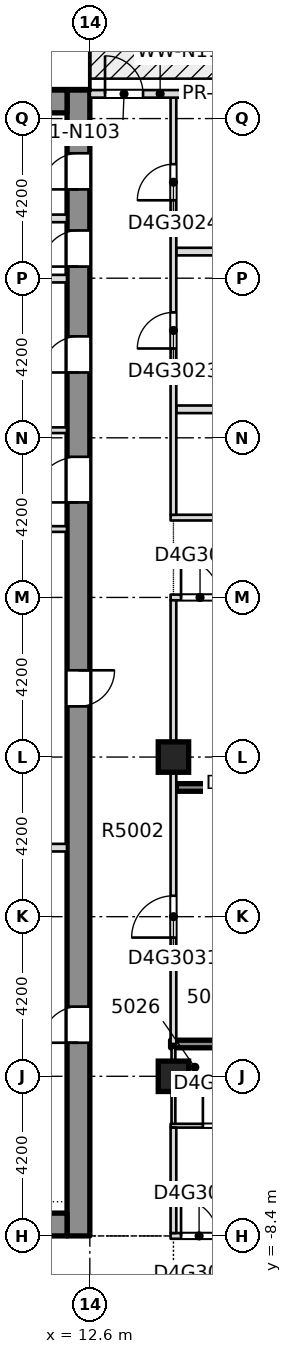
"""IFC4 building model, lengths in metres.
Left out: names, types, materials, properties, quantities, classifications, styles, units other than length and angle.
Written with IfcOpenShell. Run it as: python <this file> out.ifc"""

import sys

from ifc_helpers import new_model, si_unit, direction, frame, frame_2d, origin, origin_2d, place, context, subcontext, project, spatial, rectangle, extrude, element, fill, save


model = new_model("IFC4")
c1 = context("Model", 3, precision=1e-05, world=origin(), true_north=direction((0.0, 1.0)))
c2 = subcontext(c1, "Body", "Model", "MODEL_VIEW")
j1 = project(units=[si_unit("LENGTHUNIT", "METRE"), si_unit("PLANEANGLEUNIT", "RADIAN")], contexts=[c1])
p1 = place(None, origin())
s1 = spatial("IfcSite", under=j1, at=p1, CompositionType="ELEMENT")
p2 = place(p1, origin())
s2 = spatial("IfcBuilding", under=s1, at=p2, CompositionType="ELEMENT")
p3 = place(p2, frame((0.0, 0.0, 192.8)))
s3 = spatial("IfcBuildingStorey", under=s2, at=p3, CompositionType="ELEMENT", Elevation=192.8)
p4 = place(p3, frame((12.3, -8.4, -0.4), z_axis=(0.0, 0.0, 1.0), x_axis=(0.0, 1.0, 0.0)))
e1 = element("IfcWall", 1, at=p4, inside=s3, PredefinedType="SHEAR", context=c2, shape_type="SweptSolid", body=[
    extrude(rectangle(XDim=30.15, YDim=0.6, at=frame_2d((15.075, 0.0))), origin(), (0.0, 0.0, 1.0), 3.45),
])
p5 = place(p4, frame((5.083, 0.0, 0.4)))
e2 = element("IfcOpeningElement", 2, at=p5, cuts=e1, PredefinedType="OPENING", context=c2, shape_type="SweptSolid", body=[
    extrude(rectangle(XDim=0.95, YDim=2.1, at=frame_2d((0.475, 1.05))), frame((0.0, 0.31, 0.0), z_axis=(0.0, -1.0, 0.0), x_axis=(1.0, 0.0, 0.0)), (0.0, 0.0, 1.0), 0.62),
])
p6 = place(p4, frame((13.933, 0.0, 0.4)))
e3 = element("IfcOpeningElement", 3, at=p6, cuts=e1, PredefinedType="OPENING", context=c2, shape_type="SweptSolid", body=[
    extrude(rectangle(XDim=0.95, YDim=2.1, at=frame_2d((0.475, 1.05))), frame((0.0, 0.31, 0.0), z_axis=(0.0, -1.0, 0.0), x_axis=(1.0, 0.0, 0.0)), (0.0, 0.0, 1.0), 0.62),
])
p7 = place(p4, frame((22.719, 0.0, 0.4)))
e4 = element("IfcOpeningElement", 4, at=p7, cuts=e1, PredefinedType="OPENING", context=c2, shape_type="SweptSolid", body=[
    extrude(rectangle(XDim=0.95, YDim=2.1, at=frame_2d((0.475, 1.05))), frame((0.0, 0.31, 0.0), z_axis=(0.0, -1.0, 0.0), x_axis=(1.0, 0.0, 0.0)), (0.0, 0.0, 1.0), 0.62),
])
p8 = place(p4, frame((25.506, 0.0, 0.4)))
e5 = element("IfcOpeningElement", 5, at=p8, cuts=e1, PredefinedType="OPENING", context=c2, shape_type="SweptSolid", body=[
    extrude(rectangle(XDim=0.95, YDim=2.1, at=frame_2d((0.475, 1.05))), frame((0.0, 0.31, 0.0), z_axis=(0.0, -1.0, 0.0), x_axis=(1.0, 0.0, 0.0)), (0.0, 0.0, 1.0), 0.62),
])
p9 = place(p4, frame((27.537, 0.0, 0.4)))
e6 = element("IfcOpeningElement", 6, at=p9, cuts=e1, PredefinedType="OPENING", context=c2, shape_type="SweptSolid", body=[
    extrude(rectangle(XDim=0.95, YDim=2.1, at=frame_2d((0.475, 1.05))), frame((0.0, 0.31, 0.0), z_axis=(0.0, -1.0, 0.0), x_axis=(1.0, 0.0, 0.0)), (0.0, 0.0, 1.0), 0.62),
])
p10 = place(p4, frame((19.3, 0.0, 0.4)))
e7 = element("IfcOpeningElement", 7, at=p10, cuts=e1, PredefinedType="OPENING", context=c2, shape_type="SweptSolid", body=[
    extrude(rectangle(XDim=1.2, YDim=2.1, at=frame_2d((0.6, 1.05))), frame((0.0, 0.31, 0.0), z_axis=(0.0, -1.0, 0.0), x_axis=(1.0, 0.0, 0.0)), (0.0, 0.0, 1.0), 0.62),
])
p11 = place(p3, frame((-12.0, -8.1, -0.4), z_axis=(0.0, 0.0, 1.0), x_axis=(1.0, 0.0, 0.0)))
e8 = element("IfcWall", 8, at=p11, inside=s3, PredefinedType="SHEAR", context=c2, shape_type="SweptSolid", body=[
    extrude(rectangle(XDim=24.0, YDim=0.6, at=frame_2d((12.0, 0.0))), origin(), (0.0, 0.0, 1.0), 3.45),
])
p12 = place(p11, frame((7.25, 0.0, 0.4)))
e9 = element("IfcOpeningElement", 9, at=p12, cuts=e8, PredefinedType="OPENING", context=c2, shape_type="SweptSolid", body=[
    extrude(rectangle(XDim=1.8, YDim=2.1, at=frame_2d((0.9, 1.05))), frame((0.0, 0.31, 0.0), z_axis=(0.0, -1.0, 0.0), x_axis=(1.0, 0.0, 0.0)), (0.0, 0.0, 1.0), 0.62),
])
p13 = place(p11, frame((14.95, 0.0, 0.4)))
e10 = element("IfcOpeningElement", 10, at=p13, cuts=e8, PredefinedType="OPENING", context=c2, shape_type="SweptSolid", body=[
    extrude(rectangle(XDim=1.8, YDim=2.1, at=frame_2d((0.9, 1.05))), frame((0.0, 0.31, 0.0), z_axis=(0.0, -1.0, 0.0), x_axis=(1.0, 0.0, 0.0)), (0.0, 0.0, 1.0), 0.62),
])
p14 = place(p3, frame((-12.0, 21.45, -0.4), z_axis=(0.0, 0.0, 1.0), x_axis=(1.0, 0.0, 0.0)))
e11 = element("IfcWall", 11, at=p14, inside=s3, PredefinedType="SHEAR", context=c2, shape_type="SweptSolid", body=[
    extrude(rectangle(XDim=24.0, YDim=0.6, at=frame_2d((12.0, 0.0))), origin(), (0.0, 0.0, 1.0), 3.45),
])
for number, where, z_axis, x_axis in (
    (12, (14.8, -4.2, -0.4), (0.0, 0.0, 1.0), (1.0, 0.0, 0.0)),
    (13, (14.8, 4.2, -0.4), (0.0, 0.0, 1.0), (1.0, 0.0, 0.0)),
):
    element("IfcColumn", number, at=place(p3, frame(where, z_axis=z_axis, x_axis=x_axis)), inside=s3, PredefinedType="COLUMN", context=c2, shape_type="SweptSolid", body=[
        extrude(rectangle(XDim=0.8, YDim=0.8, at=origin_2d()), origin(), (0.0, 0.0, 1.0), 3.45),
    ])
p15 = place(p3, frame((14.725, -8.4, 0.0), z_axis=(0.0, 0.0, 1.0), x_axis=(1.0, 0.0, 0.0)))
e14 = element("IfcWall", 14, at=p15, inside=s3, PredefinedType="PARTITIONING", context=c2, shape_type="SweptSolid", body=[
    extrude(rectangle(XDim=11.025, YDim=0.15, at=frame_2d((5.512, 0.0))), origin(), (0.0, 0.0, 1.0), 3.05),
])
p16 = place(p15, frame((0.275, 0.0, 0.0)))
e15 = element("IfcOpeningElement", 15, at=p16, cuts=e14, PredefinedType="OPENING", context=c2, shape_type="SweptSolid", body=[
    extrude(rectangle(XDim=0.95, YDim=2.1, at=frame_2d((0.475, 1.05))), frame((0.0, 0.085, 0.0), z_axis=(0.0, -1.0, 0.0), x_axis=(1.0, 0.0, 0.0)), (0.0, 0.0, 1.0), 0.17),
])
p17 = place(p3, frame((14.725, -5.5, 0.0), z_axis=(0.0, 0.0, 1.0), x_axis=(1.0, 0.0, 0.0)))
e16 = element("IfcWall", 16, at=p17, inside=s3, PredefinedType="PARTITIONING", context=c2, shape_type="SweptSolid", body=[
    extrude(rectangle(XDim=2.525, YDim=0.1, at=frame_2d((1.262, 0.0))), origin(), (0.0, 0.0, 1.0), 3.05),
])
p18 = place(p17, frame((0.85, 0.0, 0.0)))
e17 = element("IfcOpeningElement", 17, at=p18, cuts=e16, PredefinedType="OPENING", context=c2, shape_type="SweptSolid", body=[
    extrude(rectangle(XDim=0.85, YDim=2.1, at=frame_2d((0.425, 1.05))), frame((0.0, 0.06, 0.0), z_axis=(0.0, -1.0, 0.0), x_axis=(1.0, 0.0, 0.0)), (0.0, 0.0, 1.0), 0.12),
])
p19 = place(p3, frame((14.725, -3.35, 0.0), z_axis=(0.0, 0.0, 1.0), x_axis=(1.0, 0.0, 0.0)))
e18 = element("IfcWall", 18, at=p19, inside=s3, PredefinedType="SOLIDWALL", context=c2, shape_type="SweptSolid", body=[
    extrude(rectangle(XDim=2.525, YDim=0.2, at=frame_2d((1.262, 0.0))), origin(), (0.0, 0.0, 1.0), 3.05),
])
p20 = place(p3, frame((14.875, 3.4, 0.0), z_axis=(0.0, 0.0, 1.0), x_axis=(1.0, 0.0, 0.0)))
e19 = element("IfcWall", 19, at=p20, inside=s3, PredefinedType="SOLIDWALL", context=c2, shape_type="SweptSolid", body=[
    extrude(rectangle(XDim=5.575, YDim=0.2, at=frame_2d((2.788, 0.0))), origin(), (0.0, 0.0, 1.0), 3.05),
])
p21 = place(p3, frame((14.725, 8.4, 0.0), z_axis=(0.0, 0.0, 1.0), x_axis=(1.0, 0.0, 0.0)))
e20 = element("IfcWall", 20, at=p21, inside=s3, PredefinedType="PARTITIONING", context=c2, shape_type="SweptSolid", body=[
    extrude(rectangle(XDim=11.025, YDim=0.15, at=frame_2d((5.512, 0.0))), origin(), (0.0, 0.0, 1.0), 3.05),
])
p22 = place(p21, frame((0.275, 0.0, 0.0)))
e21 = element("IfcOpeningElement", 21, at=p22, cuts=e20, PredefinedType="OPENING", context=c2, shape_type="SweptSolid", body=[
    extrude(rectangle(XDim=1.0, YDim=2.1, at=frame_2d((0.5, 1.05))), frame((0.0, 0.085, 0.0), z_axis=(0.0, -1.0, 0.0), x_axis=(1.0, 0.0, 0.0)), (0.0, 0.0, 1.0), 0.17),
])
p23 = place(p3, frame((14.725, 10.5, 0.0), z_axis=(0.0, 0.0, 1.0), x_axis=(1.0, 0.0, 0.0)))
e22 = element("IfcWall", 22, at=p23, inside=s3, PredefinedType="PARTITIONING", context=c2, shape_type="SweptSolid", body=[
    extrude(rectangle(XDim=11.025, YDim=0.15, at=frame_2d((5.512, 0.0))), origin(), (0.0, 0.0, 1.0), 3.05),
])
p24 = place(p23, frame((5.15, 0.0, 0.0)))
e23 = element("IfcOpeningElement", 23, at=p24, cuts=e22, PredefinedType="OPENING", context=c2, shape_type="SweptSolid", body=[
    extrude(rectangle(XDim=1.0, YDim=2.1, at=frame_2d((0.5, 1.05))), frame((0.0, 0.085, 0.0), z_axis=(0.0, -1.0, 0.0), x_axis=(1.0, 0.0, 0.0)), (0.0, 0.0, 1.0), 0.17),
])
for number, where, z_axis, x_axis in (
    (24, (14.875, 13.35, 0.0), (0.0, 0.0, 1.0), (1.0, 0.0, 0.0)),
    (25, (14.875, 17.5, 0.0), (0.0, 0.0, 1.0), (1.0, 0.0, 0.0)),
):
    element("IfcWall", number, at=place(p3, frame(where, z_axis=z_axis, x_axis=x_axis)), inside=s3, PredefinedType="PARTITIONING", context=c2, shape_type="SweptSolid", body=[
        extrude(rectangle(XDim=2.475, YDim=0.2, at=frame_2d((1.238, 0.0))), origin(), (0.0, 0.0, 1.0), 3.05),
    ])
p25 = place(p3, frame((14.8, -8.325, 0.0), z_axis=(0.0, 0.0, 1.0), x_axis=(0.0, 1.0, 0.0)))
e26 = element("IfcWall", 26, at=p25, inside=s3, PredefinedType="PARTITIONING", context=c2, shape_type="SweptSolid", body=[
    extrude(rectangle(XDim=2.775, YDim=0.15, at=frame_2d((1.387, 0.0))), origin(), (0.0, 0.0, 1.0), 3.05),
])
p26 = place(p3, frame((14.8, -5.45, 0.0), z_axis=(0.0, 0.0, 1.0), x_axis=(0.0, 1.0, 0.0)))
e27 = element("IfcWall", 27, at=p26, inside=s3, PredefinedType="PARTITIONING", context=c2, shape_type="SweptSolid", body=[
    extrude(rectangle(XDim=2.0, YDim=0.1, at=frame_2d((1.0, 0.0))), origin(), (0.0, 0.0, 1.0), 3.05),
])
p27 = place(p3, frame((14.8, -3.35, 0.0), z_axis=(0.0, 0.0, 1.0), x_axis=(0.0, 1.0, 0.0)))
e28 = element("IfcWall", 28, at=p27, inside=s3, PredefinedType="PARTITIONING", context=c2, shape_type="SweptSolid", body=[
    extrude(rectangle(XDim=11.675, YDim=0.15, at=frame_2d((5.837, 0.0))), origin(), (0.0, 0.0, 1.0), 3.05),
])
p28 = place(p27, frame((2.8, 0.0, 0.0)))
e29 = element("IfcOpeningElement", 29, at=p28, cuts=e28, PredefinedType="OPENING", context=c2, shape_type="SweptSolid", body=[
    extrude(rectangle(XDim=1.1, YDim=2.1, at=frame_2d((0.55, 1.05))), frame((0.0, 0.085, 0.0), z_axis=(0.0, -1.0, 0.0), x_axis=(1.0, 0.0, 0.0)), (0.0, 0.0, 1.0), 0.17),
])
p29 = place(p3, frame((14.8, 10.575, 0.0), z_axis=(0.0, 0.0, 1.0), x_axis=(0.0, 1.0, 0.0)))
e30 = element("IfcWall", 30, at=p29, inside=s3, PredefinedType="PARTITIONING", context=c2, shape_type="SweptSolid", body=[
    extrude(rectangle(XDim=10.975, YDim=0.15, at=frame_2d((5.488, 0.0))), origin(), (0.0, 0.0, 1.0), 3.05),
])
p30 = place(p29, frame((4.375, 0.0, 0.0)))
e31 = element("IfcOpeningElement", 31, at=p30, cuts=e30, PredefinedType="OPENING", context=c2, shape_type="SweptSolid", body=[
    extrude(rectangle(XDim=0.95, YDim=2.1, at=frame_2d((0.475, 1.05))), frame((0.0, 0.085, 0.0), z_axis=(0.0, -1.0, 0.0), x_axis=(1.0, 0.0, 0.0)), (0.0, 0.0, 1.0), 0.17),
])
p31 = place(p29, frame((8.275, 0.0, 0.0)))
e32 = element("IfcOpeningElement", 32, at=p31, cuts=e30, PredefinedType="OPENING", context=c2, shape_type="SweptSolid", body=[
    extrude(rectangle(XDim=0.95, YDim=2.1, at=frame_2d((0.475, 1.05))), frame((0.0, 0.085, 0.0), z_axis=(0.0, -1.0, 0.0), x_axis=(1.0, 0.0, 0.0)), (0.0, 0.0, 1.0), 0.17),
])
p32 = place(p3, frame((16.3, 21.65, 0.0), z_axis=(0.0, 0.0, 1.0), x_axis=(-1.0, 0.0, 0.0)))
e33 = element("IfcWall", 33, at=p32, inside=s3, PredefinedType="STANDARD", context=c2, shape_type="SweptSolid", body=[
    extrude(rectangle(XDim=3.7, YDim=0.2, at=frame_2d((1.85, 0.0))), origin(), (0.0, 0.0, 1.0), 3.05),
])
p33 = place(p32, frame((2.3, 0.0, 0.0)))
e34 = element("IfcOpeningElement", 34, at=p33, cuts=e33, PredefinedType="OPENING", context=c2, shape_type="SweptSolid", body=[
    extrude(rectangle(XDim=1.0, YDim=2.4, at=frame_2d((0.5, 1.2))), frame((0.0, 0.11, 0.0), z_axis=(0.0, -1.0, 0.0), x_axis=(1.0, 0.0, 0.0)), (0.0, 0.0, 1.0), 0.22),
])
p34 = place(p3, frame((8.701, 1.816, 0.0), z_axis=(0.0, 0.0, 1.0), x_axis=(1.0, 0.0, 0.0)))
e35 = element("IfcWall", 35, at=p34, inside=s3, PredefinedType="PARTITIONING", context=c2, shape_type="SweptSolid", body=[
    extrude(rectangle(XDim=3.298, YDim=0.2, at=frame_2d((1.649, 0.0))), origin(), (0.0, 0.0, 1.0), 3.05),
])
for number, where, z_axis, x_axis in (
    (36, (8.701, 10.2, 0.0), (0.0, 0.0, 1.0), (1.0, 0.0, 0.0)),
    (37, (8.701, 12.8, 0.0), (0.0, 0.0, 1.0), (1.0, 0.0, 0.0)),
):
    element("IfcWall", number, at=place(p3, frame(where, z_axis=z_axis, x_axis=x_axis)), inside=s3, PredefinedType="PARTITIONING", context=c2, shape_type="SweptSolid", body=[
        extrude(rectangle(XDim=3.298, YDim=0.15, at=frame_2d((1.649, 0.0))), origin(), (0.0, 0.0, 1.0), 3.05),
    ])
for number, where, z_axis, x_axis in (
    (38, (8.701, 16.788, 0.0), (0.0, 0.0, 1.0), (1.0, 0.0, 0.0)),
    (39, (8.701, 18.373, 0.0), (0.0, 0.0, 1.0), (1.0, 0.0, 0.0)),
):
    element("IfcWall", number, at=place(p3, frame(where, z_axis=z_axis, x_axis=x_axis)), inside=s3, PredefinedType="PARTITIONING", context=c2, shape_type="SweptSolid", body=[
        extrude(rectangle(XDim=3.298, YDim=0.2, at=frame_2d((1.649, 0.0))), origin(), (0.0, 0.0, 1.0), 3.05),
    ])
p35 = place(p16, origin())
e40 = element("IfcDoor", 40, at=p35, inside=s3, OperationType="SINGLE_SWING_LEFT", PredefinedType="DOOR", context=c2, shape_type="SweptSolid", body=[
    extrude(rectangle(XDim=0.95, YDim=2.1, at=frame_2d((0.475, 1.05))), frame((0.0, 0.025, 0.0), z_axis=(0.0, -1.0, 0.0), x_axis=(1.0, 0.0, 0.0)), (0.0, 0.0, 1.0), 0.05),
])
fill(e15, e40)
p36 = place(p18, origin())
e41 = element("IfcDoor", 41, at=p36, inside=s3, OperationType="SINGLE_SWING_LEFT", PredefinedType="DOOR", context=c2, shape_type="SweptSolid", body=[
    extrude(rectangle(XDim=0.85, YDim=2.1, at=frame_2d((0.425, 1.05))), frame((0.0, 0.025, 0.0), z_axis=(0.0, -1.0, 0.0), x_axis=(1.0, 0.0, 0.0)), (0.0, 0.0, 1.0), 0.05),
])
fill(e17, e41)
p37 = place(p22, origin())
e42 = element("IfcDoor", 42, at=p37, inside=s3, OperationType="SINGLE_SWING_RIGHT", PredefinedType="DOOR", context=c2, shape_type="SweptSolid", body=[
    extrude(rectangle(XDim=1.0, YDim=2.1, at=frame_2d((0.5, 1.05))), frame((0.0, 0.025, 0.0), z_axis=(0.0, -1.0, 0.0), x_axis=(1.0, 0.0, 0.0)), (0.0, 0.0, 1.0), 0.05),
])
fill(e21, e42)
p38 = place(p30, origin())
e43 = element("IfcDoor", 43, at=p38, inside=s3, OperationType="SINGLE_SWING_RIGHT", PredefinedType="DOOR", context=c2, shape_type="SweptSolid", body=[
    extrude(rectangle(XDim=0.95, YDim=2.1, at=frame_2d((0.475, 1.05))), frame((0.0, 0.025, 0.0), z_axis=(0.0, -1.0, 0.0), x_axis=(1.0, 0.0, 0.0)), (0.0, 0.0, 1.0), 0.05),
])
fill(e31, e43)
p39 = place(p31, origin())
e44 = element("IfcDoor", 44, at=p39, inside=s3, OperationType="SINGLE_SWING_LEFT", PredefinedType="DOOR", context=c2, shape_type="SweptSolid", body=[
    extrude(rectangle(XDim=0.95, YDim=2.1, at=frame_2d((0.475, 1.05))), frame((0.0, 0.025, 0.0), z_axis=(0.0, -1.0, 0.0), x_axis=(1.0, 0.0, 0.0)), (0.0, 0.0, 1.0), 0.05),
])
fill(e32, e44)
p40 = place(p28, origin())
e45 = element("IfcDoor", 45, at=p40, inside=s3, OperationType="SINGLE_SWING_LEFT", PredefinedType="DOOR", context=c2, shape_type="SweptSolid", body=[
    extrude(rectangle(XDim=1.1, YDim=2.1, at=frame_2d((0.55, 1.05))), frame((0.0, 0.025, 0.0), z_axis=(0.0, -1.0, 0.0), x_axis=(1.0, 0.0, 0.0)), (0.0, 0.0, 1.0), 0.05),
])
fill(e29, e45)
p41 = place(p33, origin())
e46 = element("IfcDoor", 46, at=p41, inside=s3, OperationType="SINGLE_SWING_LEFT", PredefinedType="DOOR", context=c2, shape_type="SweptSolid", body=[
    extrude(rectangle(XDim=1.0, YDim=2.4, at=frame_2d((0.5, 1.2))), frame((0.0, 0.025, 0.0), z_axis=(0.0, -1.0, 0.0), x_axis=(1.0, 0.0, 0.0)), (0.0, 0.0, 1.0), 0.05),
])
fill(e34, e46)
p42 = place(p5, origin())
e47 = element("IfcDoor", 47, at=p42, inside=s3, OperationType="SINGLE_SWING_LEFT", PredefinedType="DOOR", context=c2, shape_type="SweptSolid", body=[
    extrude(rectangle(XDim=0.95, YDim=2.1, at=frame_2d((0.475, 1.05))), frame((0.0, 0.025, 0.0), z_axis=(0.0, -1.0, 0.0), x_axis=(1.0, 0.0, 0.0)), (0.0, 0.0, 1.0), 0.05),
])
fill(e2, e47)
p43 = place(p6, origin())
e48 = element("IfcDoor", 48, at=p43, inside=s3, OperationType="SINGLE_SWING_LEFT", PredefinedType="DOOR", context=c2, shape_type="SweptSolid", body=[
    extrude(rectangle(XDim=0.95, YDim=2.1, at=frame_2d((0.475, 1.05))), frame((0.0, 0.025, 0.0), z_axis=(0.0, -1.0, 0.0), x_axis=(1.0, 0.0, 0.0)), (0.0, 0.0, 1.0), 0.05),
])
fill(e3, e48)
p44 = place(p7, origin())
e49 = element("IfcDoor", 49, at=p44, inside=s3, OperationType="SINGLE_SWING_LEFT", PredefinedType="DOOR", context=c2, shape_type="SweptSolid", body=[
    extrude(rectangle(XDim=0.95, YDim=2.1, at=frame_2d((0.475, 1.05))), frame((0.0, 0.025, 0.0), z_axis=(0.0, -1.0, 0.0), x_axis=(1.0, 0.0, 0.0)), (0.0, 0.0, 1.0), 0.05),
])
fill(e4, e49)
p45 = place(p8, origin())
e50 = element("IfcDoor", 50, at=p45, inside=s3, OperationType="SINGLE_SWING_LEFT", PredefinedType="DOOR", context=c2, shape_type="SweptSolid", body=[
    extrude(rectangle(XDim=0.95, YDim=2.1, at=frame_2d((0.475, 1.05))), frame((0.0, 0.025, 0.0), z_axis=(0.0, -1.0, 0.0), x_axis=(1.0, 0.0, 0.0)), (0.0, 0.0, 1.0), 0.05),
])
fill(e5, e50)
p46 = place(p9, origin())
e51 = element("IfcDoor", 51, at=p46, inside=s3, OperationType="SINGLE_SWING_LEFT", PredefinedType="DOOR", context=c2, shape_type="SweptSolid", body=[
    extrude(rectangle(XDim=0.95, YDim=2.1, at=frame_2d((0.475, 1.05))), frame((0.0, 0.025, 0.0), z_axis=(0.0, -1.0, 0.0), x_axis=(1.0, 0.0, 0.0)), (0.0, 0.0, 1.0), 0.05),
])
fill(e6, e51)
p47 = place(p10, origin())
e52 = element("IfcDoor", 52, at=p47, inside=s3, OperationType="SINGLE_SWING_LEFT", PredefinedType="DOOR", context=c2, shape_type="SweptSolid", body=[
    extrude(rectangle(XDim=1.2, YDim=2.1, at=frame_2d((0.6, 1.05))), frame((0.0, 0.025, 0.0), z_axis=(0.0, -1.0, 0.0), x_axis=(1.0, 0.0, 0.0)), (0.0, 0.0, 1.0), 0.05),
])
fill(e7, e52)
save(model, sys.argv[1])
